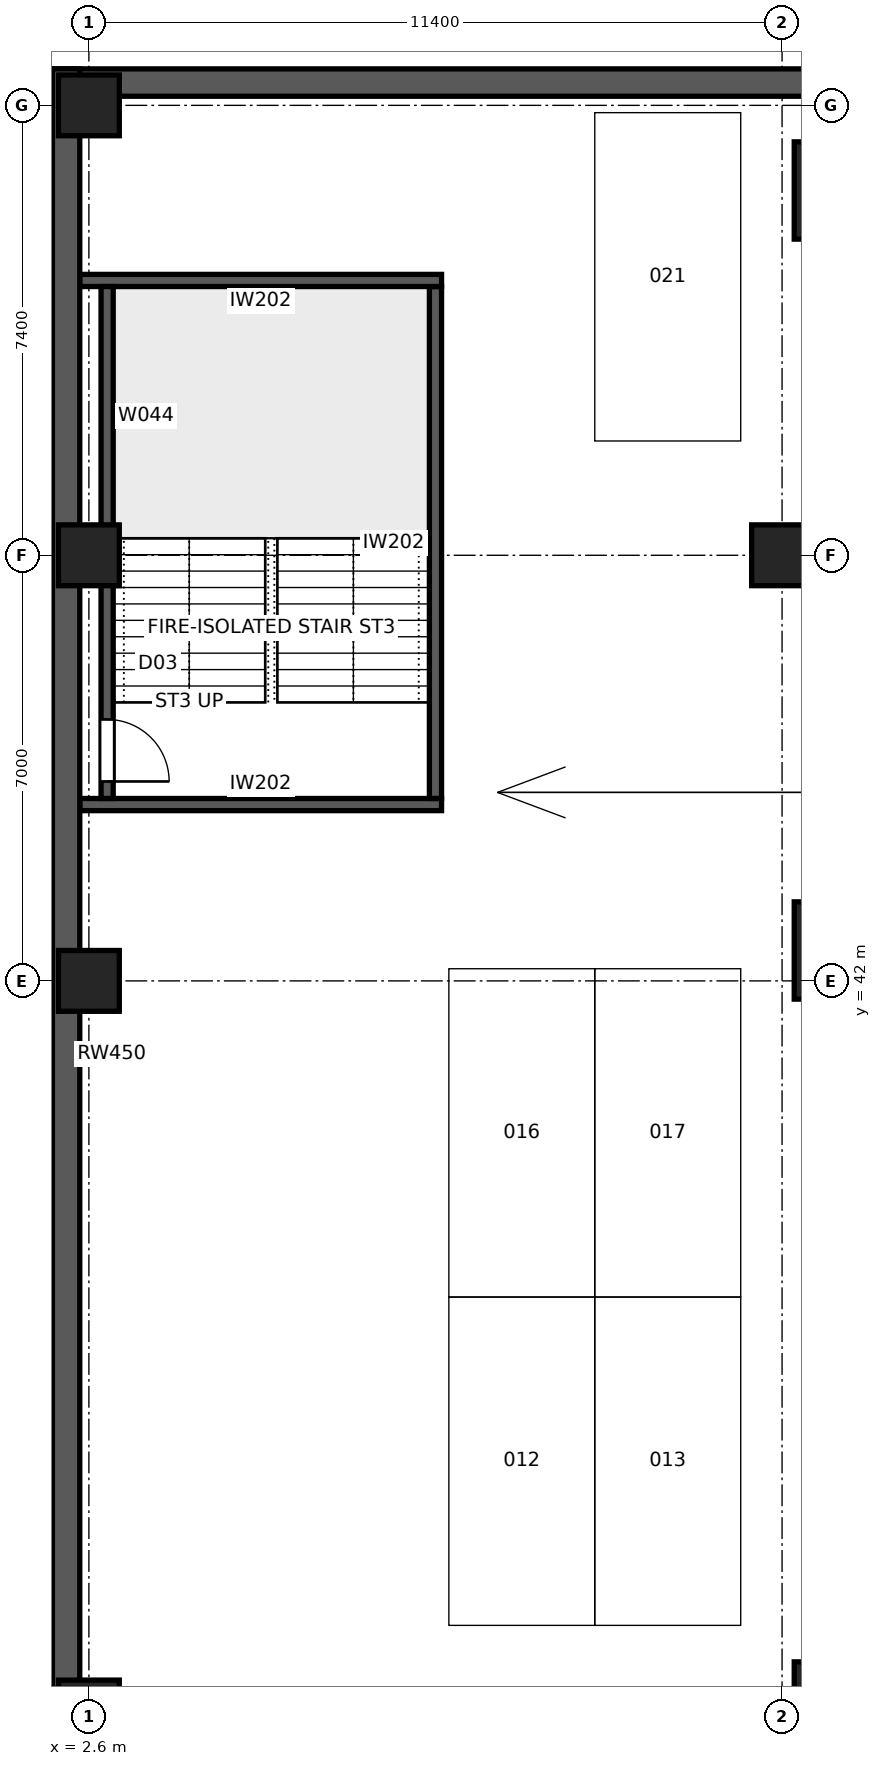
"""IFC4 building model, lengths in metres.
Left out: names, types, materials, properties, quantities, classifications, styles, units other than length and angle.
Written with IfcOpenShell. Run it as: python <this file> out.ifc"""

import sys

from ifc_helpers import new_model, si_unit, direction, frame, frame_2d, origin, origin_2d, place, context, subcontext, project, spatial, rectangle, extrude, element, fill, save


model = new_model("IFC4")
c1 = context("Model", 3, precision=1e-05, world=origin(), true_north=direction((0.0, 1.0)))
c2 = subcontext(c1, "Body", "Model", "MODEL_VIEW")
j1 = project(units=[si_unit("LENGTHUNIT", "METRE"), si_unit("PLANEANGLEUNIT", "RADIAN")], contexts=[c1])
p1 = place(None, origin())
s1 = spatial("IfcSite", under=j1, at=p1, CompositionType="ELEMENT")
p2 = place(p1, origin())
s2 = spatial("IfcBuilding", under=s1, at=p2, CompositionType="ELEMENT")
p3 = place(p2, frame((0.0, 0.0, -7.4)))
s3 = spatial("IfcBuildingStorey", under=s2, at=p3, CompositionType="ELEMENT", Elevation=-7.4)
for number, where, z_axis, x_axis in (
    (1, (15.0, 55.0, -0.4), (0.0, 0.0, 1.0), (1.0, 0.0, 0.0)),
    (2, (15.0, 42.5, -0.4), (0.0, 0.0, 1.0), (1.0, 0.0, 0.0)),
    (3, (15.0, 30.0, -0.4), (0.0, 0.0, 1.0), (1.0, 0.0, 0.0)),
):
    element("IfcColumn", number, at=place(p3, frame(where, z_axis=z_axis, x_axis=x_axis)), inside=s3, PredefinedType="COLUMN", context=c2, shape_type="SweptSolid", body=[
        extrude(rectangle(XDim=1.6, YDim=1.6, at=origin_2d()), origin(), (0.0, 0.0, 1.0), 4.1),
    ])
for number, where, z_axis, x_axis in (
    (4, (2.6, 30.0, -0.4), (0.0, 0.0, 1.0), (1.0, 0.0, 0.0)),
    (5, (2.6, 42.0, -0.4), (0.0, 0.0, 1.0), (1.0, 0.0, 0.0)),
    (6, (2.6, 49.0, -0.4), (0.0, 0.0, 1.0), (1.0, 0.0, 0.0)),
    (7, (2.6, 56.4, -0.4), (0.0, 0.0, 1.0), (1.0, 0.0, 0.0)),
    (8, (14.0, 49.0, -0.4), (0.0, 0.0, 1.0), (1.0, 0.0, 0.0)),
):
    element("IfcColumn", number, at=place(p3, frame(where, z_axis=z_axis, x_axis=x_axis)), inside=s3, PredefinedType="COLUMN", context=c2, shape_type="SweptSolid", body=[
        extrude(rectangle(XDim=1.0, YDim=1.0, at=origin_2d()), origin(), (0.0, 0.0, 1.0), 4.1),
    ])
p4 = place(p3, frame((78.0, 56.775, -0.4), z_axis=(0.0, 0.0, 1.0), x_axis=(-1.0, 0.0, 0.0)))
e9 = element("IfcWall", 9, at=p4, inside=s3, PredefinedType="SHEAR", context=c2, shape_type="SweptSolid", body=[
    extrude(rectangle(XDim=76.0, YDim=0.45, at=frame_2d((38.0, 0.0))), origin(), (0.0, 0.0, 1.0), 4.1),
])
p5 = place(p3, frame((2.225, 57.0, -0.4), z_axis=(0.0, 0.0, 1.0), x_axis=(0.0, -1.0, 0.0)))
e10 = element("IfcWall", 10, at=p5, inside=s3, PredefinedType="SHEAR", context=c2, shape_type="SweptSolid", body=[
    extrude(rectangle(XDim=54.0, YDim=0.45, at=frame_2d((27.0, 0.0))), origin(), (0.0, 0.0, 1.0), 4.1),
])
p6 = place(p3, frame((2.45, 44.9, 0.0), z_axis=(0.0, 0.0, 1.0), x_axis=(1.0, 0.0, 0.0)))
e11 = element("IfcWall", 11, at=p6, inside=s3, PredefinedType="SOLIDWALL", context=c2, shape_type="SweptSolid", body=[
    extrude(rectangle(XDim=5.95, YDim=0.2, at=frame_2d((2.975, 0.0))), origin(), (0.0, 0.0, 1.0), 3.35),
])
p7 = place(p3, frame((8.3, 45.0, 0.0), z_axis=(0.0, 0.0, 1.0), x_axis=(0.0, 1.0, 0.0)))
e12 = element("IfcWall", 12, at=p7, inside=s3, PredefinedType="SOLIDWALL", context=c2, shape_type="SweptSolid", body=[
    extrude(rectangle(XDim=8.42, YDim=0.2, at=frame_2d((4.21, 0.0))), origin(), (0.0, 0.0, 1.0), 3.35),
])
p8 = place(p3, frame((8.4, 53.52, 0.0), z_axis=(0.0, 0.0, 1.0), x_axis=(-1.0, 0.0, 0.0)))
e13 = element("IfcWall", 13, at=p8, inside=s3, PredefinedType="SOLIDWALL", context=c2, shape_type="SweptSolid", body=[
    extrude(rectangle(XDim=5.95, YDim=0.2, at=frame_2d((2.975, 0.0))), origin(), (0.0, 0.0, 1.0), 3.35),
])
p9 = place(p3, frame((2.9, 53.42, 0.0), z_axis=(0.0, 0.0, 1.0), x_axis=(0.0, -1.0, 0.0)))
e14 = element("IfcWall", 14, at=p9, inside=s3, PredefinedType="SOLIDWALL", context=c2, shape_type="SweptSolid", body=[
    extrude(rectangle(XDim=8.42, YDim=0.2, at=frame_2d((4.21, 0.0))), origin(), (0.0, 0.0, 1.0), 3.35),
])
p10 = place(p9, frame((7.12, 0.0, 0.0)))
e15 = element("IfcOpeningElement", 15, at=p10, cuts=e14, PredefinedType="OPENING", context=c2, shape_type="SweptSolid", body=[
    extrude(rectangle(XDim=1.02, YDim=2.1, at=frame_2d((0.51, 1.05))), frame((0.0, 0.11, 0.0), z_axis=(0.0, -1.0, 0.0), x_axis=(1.0, 0.0, 0.0)), (0.0, 0.0, 1.0), 0.22),
])
p11 = place(p10, origin())
e16 = element("IfcDoor", 16, at=p11, inside=s3, OperationType="SINGLE_SWING_RIGHT", PredefinedType="DOOR", context=c2, shape_type="SweptSolid", body=[
    extrude(rectangle(XDim=1.02, YDim=2.1, at=frame_2d((0.51, 1.05))), frame((0.0, 0.025, 0.0), z_axis=(0.0, -1.0, 0.0), x_axis=(1.0, 0.0, 0.0)), (0.0, 0.0, 1.0), 0.05),
])
fill(e15, e16)
save(model, sys.argv[1])
